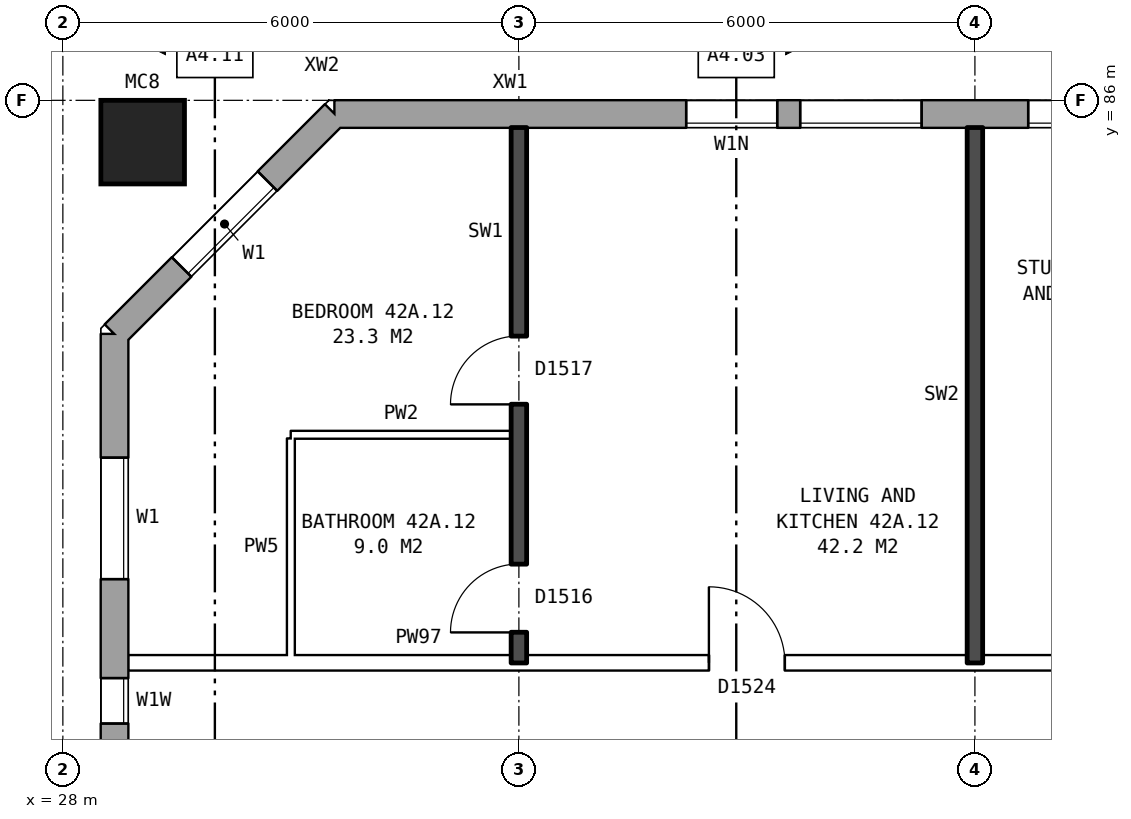
"""IFC4 building model, lengths in metres.
Left out: names, types, materials, properties, quantities, classifications, styles, units other than length and angle.
Written with IfcOpenShell. Run it as: python <this file> out.ifc"""

import sys

from ifc_helpers import new_model, si_unit, direction, frame, frame_2d, origin, origin_2d, place, context, subcontext, project, spatial, rectangle, hollow_rectangle, extrude, element, fill, save


model = new_model("IFC4")
c1 = context("Model", 3, precision=1e-05, world=origin(), true_north=direction((0.0, 1.0)))
c2 = subcontext(c1, "Body", "Model", "MODEL_VIEW")
j1 = project(units=[si_unit("LENGTHUNIT", "METRE"), si_unit("PLANEANGLEUNIT", "RADIAN")], contexts=[c1])
p1 = place(None, origin())
s1 = spatial("IfcSite", under=j1, at=p1, CompositionType="ELEMENT")
p2 = place(p1, origin())
s2 = spatial("IfcBuilding", under=s1, at=p2, CompositionType="ELEMENT")
p3 = place(p2, frame((0.0, 0.0, 151.6)))
s3 = spatial("IfcBuildingStorey", under=s2, at=p3, CompositionType="ELEMENT", Elevation=151.6)
p4 = place(p3, frame((29.05, 85.45, 0.0), z_axis=(0.0, 0.0, 1.0), x_axis=(1.0, 0.0, 0.0)))
e1 = element("IfcColumn", 1, at=p4, inside=s3, PredefinedType="COLUMN", context=c2, shape_type="SweptSolid", body=[
    extrude(hollow_rectangle(XDim=1.1, YDim=1.1, WallThickness=0.06, at=origin_2d()), origin(), (0.0, 0.0, 1.0), 3.1),
])
p5 = place(p3, frame((72.925, 85.82, 0.0), z_axis=(0.0, 0.0, 1.0), x_axis=(-1.0, 0.0, 0.0)))
e2 = element("IfcWall", 2, at=p5, inside=s3, PredefinedType="STANDARD", context=c2, shape_type="SweptSolid", body=[
    extrude(rectangle(XDim=41.351, YDim=0.36, at=frame_2d((20.675, 0.0))), origin(), (0.0, 0.0, 1.0), 2.85),
])
p6 = place(p5, frame((0.3, 0.0, 0.8)))
e3 = element("IfcOpeningElement", 3, at=p6, cuts=e2, PredefinedType="OPENING", context=c2, shape_type="SweptSolid", body=[
    extrude(rectangle(XDim=1.4, YDim=1.8, at=frame_2d((0.7, 0.9))), frame((0.0, 0.19, 0.0), z_axis=(0.0, -1.0, 0.0), x_axis=(1.0, 0.0, 0.0)), (0.0, 0.0, 1.0), 0.38),
])
p7 = place(p5, frame((4.225, 0.0, 0.8)))
e4 = element("IfcOpeningElement", 4, at=p7, cuts=e2, PredefinedType="OPENING", context=c2, shape_type="SweptSolid", body=[
    extrude(rectangle(XDim=1.0, YDim=0.9, at=frame_2d((0.5, 0.45))), frame((0.0, 0.19, 0.0), z_axis=(0.0, -1.0, 0.0), x_axis=(1.0, 0.0, 0.0)), (0.0, 0.0, 1.0), 0.38),
])
p8 = place(p5, frame((6.625, 0.0, 0.8)))
e5 = element("IfcOpeningElement", 5, at=p8, cuts=e2, PredefinedType="OPENING", context=c2, shape_type="SweptSolid", body=[
    extrude(rectangle(XDim=1.6, YDim=1.8, at=frame_2d((0.8, 0.9))), frame((0.0, 0.19, 0.0), z_axis=(0.0, -1.0, 0.0), x_axis=(1.0, 0.0, 0.0)), (0.0, 0.0, 1.0), 0.38),
])
p9 = place(p5, frame((9.625, 0.0, 0.8)))
e6 = element("IfcOpeningElement", 6, at=p9, cuts=e2, PredefinedType="OPENING", context=c2, shape_type="SweptSolid", body=[
    extrude(rectangle(XDim=1.6, YDim=1.8, at=frame_2d((0.8, 0.9))), frame((0.0, 0.19, 0.0), z_axis=(0.0, -1.0, 0.0), x_axis=(1.0, 0.0, 0.0)), (0.0, 0.0, 1.0), 0.38),
])
p10 = place(p5, frame((12.625, 0.0, 0.8)))
e7 = element("IfcOpeningElement", 7, at=p10, cuts=e2, PredefinedType="OPENING", context=c2, shape_type="SweptSolid", body=[
    extrude(rectangle(XDim=1.6, YDim=1.8, at=frame_2d((0.8, 0.9))), frame((0.0, 0.19, 0.0), z_axis=(0.0, -1.0, 0.0), x_axis=(1.0, 0.0, 0.0)), (0.0, 0.0, 1.0), 0.38),
])
p11 = place(p5, frame((15.625, 0.0, 0.8)))
e8 = element("IfcOpeningElement", 8, at=p11, cuts=e2, PredefinedType="OPENING", context=c2, shape_type="SweptSolid", body=[
    extrude(rectangle(XDim=1.6, YDim=1.8, at=frame_2d((0.8, 0.9))), frame((0.0, 0.19, 0.0), z_axis=(0.0, -1.0, 0.0), x_axis=(1.0, 0.0, 0.0)), (0.0, 0.0, 1.0), 0.38),
])
p12 = place(p5, frame((18.625, 0.0, 0.8)))
e9 = element("IfcOpeningElement", 9, at=p12, cuts=e2, PredefinedType="OPENING", context=c2, shape_type="SweptSolid", body=[
    extrude(rectangle(XDim=1.6, YDim=1.8, at=frame_2d((0.8, 0.9))), frame((0.0, 0.19, 0.0), z_axis=(0.0, -1.0, 0.0), x_axis=(1.0, 0.0, 0.0)), (0.0, 0.0, 1.0), 0.38),
])
p13 = place(p5, frame((21.625, 0.0, 0.8)))
e10 = element("IfcOpeningElement", 10, at=p13, cuts=e2, PredefinedType="OPENING", context=c2, shape_type="SweptSolid", body=[
    extrude(rectangle(XDim=1.6, YDim=1.8, at=frame_2d((0.8, 0.9))), frame((0.0, 0.19, 0.0), z_axis=(0.0, -1.0, 0.0), x_axis=(1.0, 0.0, 0.0)), (0.0, 0.0, 1.0), 0.38),
])
p14 = place(p5, frame((24.625, 0.0, 0.8)))
e11 = element("IfcOpeningElement", 11, at=p14, cuts=e2, PredefinedType="OPENING", context=c2, shape_type="SweptSolid", body=[
    extrude(rectangle(XDim=1.6, YDim=1.8, at=frame_2d((0.8, 0.9))), frame((0.0, 0.19, 0.0), z_axis=(0.0, -1.0, 0.0), x_axis=(1.0, 0.0, 0.0)), (0.0, 0.0, 1.0), 0.38),
])
p15 = place(p5, frame((27.625, 0.0, 0.8)))
e12 = element("IfcOpeningElement", 12, at=p15, cuts=e2, PredefinedType="OPENING", context=c2, shape_type="SweptSolid", body=[
    extrude(rectangle(XDim=1.6, YDim=1.8, at=frame_2d((0.8, 0.9))), frame((0.0, 0.19, 0.0), z_axis=(0.0, -1.0, 0.0), x_axis=(1.0, 0.0, 0.0)), (0.0, 0.0, 1.0), 0.38),
])
p16 = place(p5, frame((30.625, 0.0, 0.8)))
e13 = element("IfcOpeningElement", 13, at=p16, cuts=e2, PredefinedType="OPENING", context=c2, shape_type="SweptSolid", body=[
    extrude(rectangle(XDim=1.6, YDim=1.8, at=frame_2d((0.8, 0.9))), frame((0.0, 0.19, 0.0), z_axis=(0.0, -1.0, 0.0), x_axis=(1.0, 0.0, 0.0)), (0.0, 0.0, 1.0), 0.38),
])
p17 = place(p5, frame((33.625, 0.0, 0.8)))
e14 = element("IfcOpeningElement", 14, at=p17, cuts=e2, PredefinedType="OPENING", context=c2, shape_type="SweptSolid", body=[
    extrude(rectangle(XDim=1.6, YDim=1.8, at=frame_2d((0.8, 0.9))), frame((0.0, 0.19, 0.0), z_axis=(0.0, -1.0, 0.0), x_axis=(1.0, 0.0, 0.0)), (0.0, 0.0, 1.0), 0.38),
])
p18 = place(p5, frame((35.525, 0.0, 0.8)))
e15 = element("IfcOpeningElement", 15, at=p18, cuts=e2, PredefinedType="OPENING", context=c2, shape_type="SweptSolid", body=[
    extrude(rectangle(XDim=1.2, YDim=1.2, at=frame_2d((0.6, 0.6))), frame((0.0, 0.19, 0.0), z_axis=(0.0, -1.0, 0.0), x_axis=(1.0, 0.0, 0.0)), (0.0, 0.0, 1.0), 0.38),
])
p19 = place(p5, frame((2.0, 0.0, 1.4)))
e16 = element("IfcOpeningElement", 16, at=p19, cuts=e2, PredefinedType="OPENING", context=c2, shape_type="SweptSolid", body=[
    extrude(rectangle(XDim=0.6, YDim=1.2, at=frame_2d((0.3, 0.6))), frame((0.0, 0.19, 0.0), z_axis=(0.0, -1.0, 0.0), x_axis=(1.0, 0.0, 0.0)), (0.0, 0.0, 1.0), 0.38),
])
p20 = place(p5, frame((5.525, 0.0, 0.8)))
e17 = element("IfcOpeningElement", 17, at=p20, cuts=e2, PredefinedType="OPENING", context=c2, shape_type="SweptSolid", body=[
    extrude(rectangle(XDim=0.8, YDim=1.8, at=frame_2d((0.4, 0.9))), frame((0.0, 0.19, 0.0), z_axis=(0.0, -1.0, 0.0), x_axis=(1.0, 0.0, 0.0)), (0.0, 0.0, 1.0), 0.38),
])
p21 = place(p3, frame((31.575, 85.82, 0.0), z_axis=(0.0, 0.0, 1.0), x_axis=(-0.707106781187, -0.707106781187, 0.0)))
e18 = element("IfcWall", 18, at=p21, inside=s3, PredefinedType="STANDARD", context=c2, shape_type="SweptSolid", body=[
    extrude(rectangle(XDim=4.094, YDim=0.36, at=frame_2d((2.047, 0.0))), origin(), (0.0, 0.0, 1.0), 2.85),
])
p22 = place(p21, frame((1.247, 0.0, 0.8)))
e19 = element("IfcOpeningElement", 19, at=p22, cuts=e18, PredefinedType="OPENING", context=c2, shape_type="SweptSolid", body=[
    extrude(rectangle(XDim=1.6, YDim=1.8, at=frame_2d((0.8, 0.9))), frame((0.0, 0.19, 0.0), z_axis=(0.0, -1.0, 0.0), x_axis=(1.0, 0.0, 0.0)), (0.0, 0.0, 1.0), 0.38),
])
p23 = place(p3, frame((28.68, 82.925, 0.0), z_axis=(0.0, 0.0, 1.0), x_axis=(0.0, -1.0, 0.0)))
e20 = element("IfcWall", 20, at=p23, inside=s3, PredefinedType="STANDARD", context=c2, shape_type="SweptSolid", body=[
    extrude(rectangle(XDim=25.851, YDim=0.36, at=frame_2d((12.925, 0.0))), origin(), (0.0, 0.0, 1.0), 2.85),
])
p24 = place(p23, frame((1.625, 0.0, 0.8)))
e21 = element("IfcOpeningElement", 21, at=p24, cuts=e20, PredefinedType="OPENING", context=c2, shape_type="SweptSolid", body=[
    extrude(rectangle(XDim=1.6, YDim=1.8, at=frame_2d((0.8, 0.9))), frame((0.0, 0.19, 0.0), z_axis=(0.0, -1.0, 0.0), x_axis=(1.0, 0.0, 0.0)), (0.0, 0.0, 1.0), 0.38),
])
p25 = place(p23, frame((4.525, 0.0, 1.7)))
e22 = element("IfcOpeningElement", 22, at=p25, cuts=e20, PredefinedType="OPENING", context=c2, shape_type="SweptSolid", body=[
    extrude(rectangle(XDim=0.6, YDim=0.9, at=frame_2d((0.3, 0.45))), frame((0.0, 0.19, 0.0), z_axis=(0.0, -1.0, 0.0), x_axis=(1.0, 0.0, 0.0)), (0.0, 0.0, 1.0), 0.38),
])
p26 = place(p23, frame((7.625, 0.0, 0.8)))
e23 = element("IfcOpeningElement", 23, at=p26, cuts=e20, PredefinedType="OPENING", context=c2, shape_type="SweptSolid", body=[
    extrude(rectangle(XDim=1.6, YDim=1.8, at=frame_2d((0.8, 0.9))), frame((0.0, 0.19, 0.0), z_axis=(0.0, -1.0, 0.0), x_axis=(1.0, 0.0, 0.0)), (0.0, 0.0, 1.0), 0.38),
])
p27 = place(p23, frame((10.625, 0.0, 0.8)))
e24 = element("IfcOpeningElement", 24, at=p27, cuts=e20, PredefinedType="OPENING", context=c2, shape_type="SweptSolid", body=[
    extrude(rectangle(XDim=1.6, YDim=1.8, at=frame_2d((0.8, 0.9))), frame((0.0, 0.19, 0.0), z_axis=(0.0, -1.0, 0.0), x_axis=(1.0, 0.0, 0.0)), (0.0, 0.0, 1.0), 0.38),
])
p28 = place(p23, frame((13.625, 0.0, 0.8)))
e25 = element("IfcOpeningElement", 25, at=p28, cuts=e20, PredefinedType="OPENING", context=c2, shape_type="SweptSolid", body=[
    extrude(rectangle(XDim=1.6, YDim=1.8, at=frame_2d((0.8, 0.9))), frame((0.0, 0.19, 0.0), z_axis=(0.0, -1.0, 0.0), x_axis=(1.0, 0.0, 0.0)), (0.0, 0.0, 1.0), 0.38),
])
p29 = place(p23, frame((16.625, 0.0, 0.8)))
e26 = element("IfcOpeningElement", 26, at=p29, cuts=e20, PredefinedType="OPENING", context=c2, shape_type="SweptSolid", body=[
    extrude(rectangle(XDim=1.6, YDim=1.8, at=frame_2d((0.8, 0.9))), frame((0.0, 0.19, 0.0), z_axis=(0.0, -1.0, 0.0), x_axis=(1.0, 0.0, 0.0)), (0.0, 0.0, 1.0), 0.38),
])
p30 = place(p23, frame((6.125, 0.0, 0.8)))
e27 = element("IfcOpeningElement", 27, at=p30, cuts=e20, PredefinedType="OPENING", context=c2, shape_type="SweptSolid", body=[
    extrude(rectangle(XDim=1.2, YDim=0.9, at=frame_2d((0.6, 0.45))), frame((0.0, 0.19, 0.0), z_axis=(0.0, -1.0, 0.0), x_axis=(1.0, 0.0, 0.0)), (0.0, 0.0, 1.0), 0.38),
])
p31 = place(p23, frame((22.625, 0.0, 0.8)))
e28 = element("IfcOpeningElement", 28, at=p31, cuts=e20, PredefinedType="OPENING", context=c2, shape_type="SweptSolid", body=[
    extrude(rectangle(XDim=1.6, YDim=1.8, at=frame_2d((0.8, 0.9))), frame((0.0, 0.19, 0.0), z_axis=(0.0, -1.0, 0.0), x_axis=(1.0, 0.0, 0.0)), (0.0, 0.0, 1.0), 0.38),
])
p32 = place(p23, frame((9.525, 0.0, 0.8)))
e29 = element("IfcOpeningElement", 29, at=p32, cuts=e20, PredefinedType="OPENING", context=c2, shape_type="SweptSolid", body=[
    extrude(rectangle(XDim=0.8, YDim=1.8, at=frame_2d((0.4, 0.9))), frame((0.0, 0.19, 0.0), z_axis=(0.0, -1.0, 0.0), x_axis=(1.0, 0.0, 0.0)), (0.0, 0.0, 1.0), 0.38),
])
p33 = place(p23, frame((12.525, 0.0, 0.8)))
e30 = element("IfcOpeningElement", 30, at=p33, cuts=e20, PredefinedType="OPENING", context=c2, shape_type="SweptSolid", body=[
    extrude(rectangle(XDim=0.8, YDim=1.8, at=frame_2d((0.4, 0.9))), frame((0.0, 0.19, 0.0), z_axis=(0.0, -1.0, 0.0), x_axis=(1.0, 0.0, 0.0)), (0.0, 0.0, 1.0), 0.38),
])
p34 = place(p23, frame((15.525, 0.0, 0.8)))
e31 = element("IfcOpeningElement", 31, at=p34, cuts=e20, PredefinedType="OPENING", context=c2, shape_type="SweptSolid", body=[
    extrude(rectangle(XDim=0.8, YDim=1.8, at=frame_2d((0.4, 0.9))), frame((0.0, 0.19, 0.0), z_axis=(0.0, -1.0, 0.0), x_axis=(1.0, 0.0, 0.0)), (0.0, 0.0, 1.0), 0.38),
])
p35 = place(p23, frame((18.525, 0.0, 0.8)))
e32 = element("IfcOpeningElement", 32, at=p35, cuts=e20, PredefinedType="OPENING", context=c2, shape_type="SweptSolid", body=[
    extrude(rectangle(XDim=1.0, YDim=0.9, at=frame_2d((0.5, 0.45))), frame((0.0, 0.19, 0.0), z_axis=(0.0, -1.0, 0.0), x_axis=(1.0, 0.0, 0.0)), (0.0, 0.0, 1.0), 0.38),
])
p36 = place(p23, frame((20.725, 0.0, 1.7)))
e33 = element("IfcOpeningElement", 33, at=p36, cuts=e20, PredefinedType="OPENING", context=c2, shape_type="SweptSolid", body=[
    extrude(rectangle(XDim=0.6, YDim=0.9, at=frame_2d((0.3, 0.45))), frame((0.0, 0.19, 0.0), z_axis=(0.0, -1.0, 0.0), x_axis=(1.0, 0.0, 0.0)), (0.0, 0.0, 1.0), 0.38),
])
p37 = place(p3, frame((28.86, 78.6, 0.0), z_axis=(0.0, 0.0, 1.0), x_axis=(1.0, 0.0, 0.0)))
e34 = element("IfcWall", 34, at=p37, inside=s3, PredefinedType="PARTITIONING", context=c2, shape_type="SweptSolid", body=[
    extrude(rectangle(XDim=17.04, YDim=0.2, at=frame_2d((8.52, 0.0))), origin(), (0.0, 0.0, 1.0), 2.85),
])
p38 = place(p37, frame((12.44, 0.0, 0.0)))
e35 = element("IfcOpeningElement", 35, at=p38, cuts=e34, PredefinedType="OPENING", context=c2, shape_type="SweptSolid", body=[
    extrude(rectangle(XDim=1.0, YDim=2.1, at=frame_2d((0.5, 1.05))), frame((0.0, 0.11, 0.0), z_axis=(0.0, -1.0, 0.0), x_axis=(1.0, 0.0, 0.0)), (0.0, 0.0, 1.0), 0.22),
])
p39 = place(p37, frame((7.64, 0.0, 0.0)))
e36 = element("IfcOpeningElement", 36, at=p39, cuts=e34, PredefinedType="OPENING", context=c2, shape_type="SweptSolid", body=[
    extrude(rectangle(XDim=1.0, YDim=2.1, at=frame_2d((0.5, 1.05))), frame((0.0, 0.11, 0.0), z_axis=(0.0, -1.0, 0.0), x_axis=(1.0, 0.0, 0.0)), (0.0, 0.0, 1.0), 0.22),
])
p40 = place(p3, frame((31.0, 81.6, 0.0), z_axis=(0.0, 0.0, 1.0), x_axis=(1.0, 0.0, 0.0)))
e37 = element("IfcWall", 37, at=p40, inside=s3, PredefinedType="PARTITIONING", context=c2, shape_type="SweptSolid", body=[
    extrude(rectangle(XDim=2.9, YDim=0.1, at=frame_2d((1.45, 0.0))), origin(), (0.0, 0.0, 1.0), 2.85),
])
p41 = place(p3, frame((31.0, 78.7, 0.0), z_axis=(0.0, 0.0, 1.0), x_axis=(0.0, 1.0, 0.0)))
e38 = element("IfcWall", 38, at=p41, inside=s3, PredefinedType="PARTITIONING", context=c2, shape_type="SweptSolid", body=[
    extrude(rectangle(XDim=2.85, YDim=0.1, at=frame_2d((1.425, 0.0))), origin(), (0.0, 0.0, 1.0), 2.85),
])
p42 = place(p3, frame((34.0, 78.6, 0.0), z_axis=(0.0, 0.0, 1.0), x_axis=(0.0, 1.0, 0.0)))
e39 = element("IfcWall", 39, at=p42, inside=s3, PredefinedType="SOLIDWALL", context=c2, shape_type="SweptSolid", body=[
    extrude(rectangle(XDim=7.04, YDim=0.2, at=frame_2d((3.52, 0.0))), origin(), (0.0, 0.0, 1.0), 2.85),
])
p43 = place(p42, frame((3.4, 0.0, 0.0)))
e40 = element("IfcOpeningElement", 40, at=p43, cuts=e39, PredefinedType="OPENING", context=c2, shape_type="SweptSolid", body=[
    extrude(rectangle(XDim=0.9, YDim=2.1, at=frame_2d((0.45, 1.05))), frame((0.0, 0.11, 0.0), z_axis=(0.0, -1.0, 0.0), x_axis=(1.0, 0.0, 0.0)), (0.0, 0.0, 1.0), 0.22),
])
p44 = place(p42, frame((0.4, 0.0, 0.0)))
e41 = element("IfcOpeningElement", 41, at=p44, cuts=e39, PredefinedType="OPENING", context=c2, shape_type="SweptSolid", body=[
    extrude(rectangle(XDim=0.9, YDim=2.1, at=frame_2d((0.45, 1.05))), frame((0.0, 0.11, 0.0), z_axis=(0.0, -1.0, 0.0), x_axis=(1.0, 0.0, 0.0)), (0.0, 0.0, 1.0), 0.22),
])
p45 = place(p3, frame((40.0, 78.6, 0.0), z_axis=(0.0, 0.0, 1.0), x_axis=(0.0, 1.0, 0.0)))
e42 = element("IfcWall", 42, at=p45, inside=s3, PredefinedType="SOLIDWALL", context=c2, shape_type="SweptSolid", body=[
    extrude(rectangle(XDim=7.04, YDim=0.2, at=frame_2d((3.52, 0.0))), origin(), (0.0, 0.0, 1.0), 2.85),
])
p46 = place(p16, origin())
e43 = element("IfcWindow", 43, at=p46, inside=s3, PartitioningType="SINGLE_PANEL", PredefinedType="WINDOW", context=c2, shape_type="SweptSolid", body=[
    extrude(rectangle(XDim=1.6, YDim=1.8, at=frame_2d((0.8, 0.9))), frame((0.0, 0.15, 0.0), z_axis=(0.0, -1.0, 0.0), x_axis=(1.0, 0.0, 0.0)), (0.0, 0.0, 1.0), 0.06),
])
fill(e13, e43)
p47 = place(p17, origin())
e44 = element("IfcWindow", 44, at=p47, inside=s3, PartitioningType="SINGLE_PANEL", PredefinedType="WINDOW", context=c2, shape_type="SweptSolid", body=[
    extrude(rectangle(XDim=1.6, YDim=1.8, at=frame_2d((0.8, 0.9))), frame((0.0, 0.15, 0.0), z_axis=(0.0, -1.0, 0.0), x_axis=(1.0, 0.0, 0.0)), (0.0, 0.0, 1.0), 0.06),
])
fill(e14, e44)
p48 = place(p18, origin())
e45 = element("IfcWindow", 45, at=p48, inside=s3, PartitioningType="SINGLE_PANEL", PredefinedType="WINDOW", context=c2, shape_type="SweptSolid", body=[
    extrude(rectangle(XDim=1.2, YDim=1.2, at=frame_2d((0.6, 0.6))), frame((0.0, 0.15, 0.0), z_axis=(0.0, -1.0, 0.0), x_axis=(1.0, 0.0, 0.0)), (0.0, 0.0, 1.0), 0.06),
])
fill(e15, e45)
p49 = place(p22, origin())
e46 = element("IfcWindow", 46, at=p49, inside=s3, PartitioningType="SINGLE_PANEL", PredefinedType="WINDOW", context=c2, shape_type="SweptSolid", body=[
    extrude(rectangle(XDim=1.6, YDim=1.8, at=frame_2d((0.8, 0.9))), frame((0.0, 0.15, 0.0), z_axis=(0.0, -1.0, 0.0), x_axis=(1.0, 0.0, 0.0)), (0.0, 0.0, 1.0), 0.06),
])
fill(e19, e46)
p50 = place(p24, origin())
e47 = element("IfcWindow", 47, at=p50, inside=s3, PartitioningType="SINGLE_PANEL", PredefinedType="WINDOW", context=c2, shape_type="SweptSolid", body=[
    extrude(rectangle(XDim=1.6, YDim=1.8, at=frame_2d((0.8, 0.9))), frame((0.0, 0.15, 0.0), z_axis=(0.0, -1.0, 0.0), x_axis=(1.0, 0.0, 0.0)), (0.0, 0.0, 1.0), 0.06),
])
fill(e21, e47)
p51 = place(p25, origin())
e48 = element("IfcWindow", 48, at=p51, inside=s3, PartitioningType="SINGLE_PANEL", PredefinedType="WINDOW", context=c2, shape_type="SweptSolid", body=[
    extrude(rectangle(XDim=0.6, YDim=0.9, at=frame_2d((0.3, 0.45))), frame((0.0, 0.15, 0.0), z_axis=(0.0, -1.0, 0.0), x_axis=(1.0, 0.0, 0.0)), (0.0, 0.0, 1.0), 0.06),
])
fill(e22, e48)
p52 = place(p43, origin())
e49 = element("IfcDoor", 49, at=p52, inside=s3, OperationType="SINGLE_SWING_LEFT", PredefinedType="DOOR", context=c2, shape_type="SweptSolid", body=[
    extrude(rectangle(XDim=0.9, YDim=2.1, at=frame_2d((0.45, 1.05))), frame((0.0, 0.025, 0.0), z_axis=(0.0, -1.0, 0.0), x_axis=(1.0, 0.0, 0.0)), (0.0, 0.0, 1.0), 0.05),
])
fill(e40, e49)
p53 = place(p39, origin())
e50 = element("IfcDoor", 50, at=p53, inside=s3, OperationType="SINGLE_SWING_LEFT", PredefinedType="DOOR", context=c2, shape_type="SweptSolid", body=[
    extrude(rectangle(XDim=1.0, YDim=2.1, at=frame_2d((0.5, 1.05))), frame((0.0, 0.025, 0.0), z_axis=(0.0, -1.0, 0.0), x_axis=(1.0, 0.0, 0.0)), (0.0, 0.0, 1.0), 0.05),
])
fill(e36, e50)
p54 = place(p44, origin())
e51 = element("IfcDoor", 51, at=p54, inside=s3, OperationType="SINGLE_SWING_LEFT", PredefinedType="DOOR", context=c2, shape_type="SweptSolid", body=[
    extrude(rectangle(XDim=0.9, YDim=2.1, at=frame_2d((0.45, 1.05))), frame((0.0, 0.025, 0.0), z_axis=(0.0, -1.0, 0.0), x_axis=(1.0, 0.0, 0.0)), (0.0, 0.0, 1.0), 0.05),
])
fill(e41, e51)
save(model, sys.argv[1])
